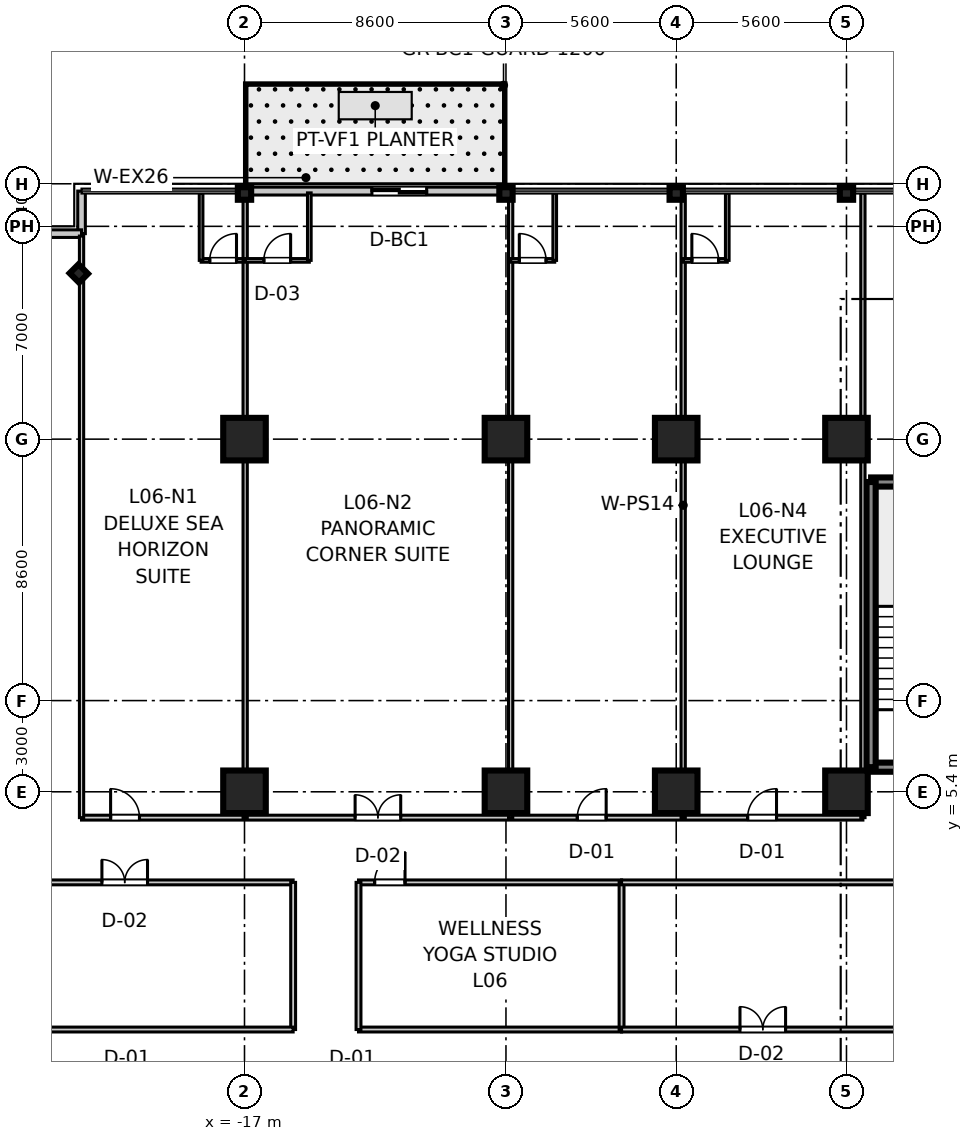
"""IFC4 building model, lengths in metres.
Left out: names, types, materials, properties, quantities, classifications, styles, units other than length and angle.
Written with IfcOpenShell. Run it as: python <this file> out.ifc"""

import sys

from ifc_helpers import new_model, si_unit, direction, frame, frame_2d, origin, origin_2d, place, context, subcontext, project, spatial, rectangle, i_section, extrude, source, transform, mapped, element, fill, save


model = new_model("IFC4")
c1 = context("Model", 3, precision=1e-05, world=origin(), true_north=direction((0.0, 1.0)))
c2 = subcontext(c1, "Body", "Model", "MODEL_VIEW")
j1 = project(units=[si_unit("LENGTHUNIT", "METRE"), si_unit("PLANEANGLEUNIT", "RADIAN")], contexts=[c1])
p1 = place(None, origin())
s1 = spatial("IfcSite", under=j1, at=p1, CompositionType="ELEMENT")
p2 = place(p1, origin())
s2 = spatial("IfcBuilding", under=s1, at=p2, CompositionType="ELEMENT")
p3 = place(p2, frame((0.0, 0.0, 32.4)))
s3 = spatial("IfcBuildingStorey", under=s2, at=p3, CompositionType="ELEMENT", Elevation=32.4)
m1 = source(origin(), c2, "Body", "SweptSolid", [
    extrude(rectangle(XDim=1.4, YDim=1.4, at=origin_2d()), origin(), (0.0, 0.0, 1.0), 3.605),
])
for number, where, z_axis, x_axis in (
    (1, (-17.0, 5.4, 0.0), (0.0, 0.0, 1.0), (1.0, 0.0, 0.0)),
    (2, (-17.0, 17.0, 0.0), (0.0, 0.0, 1.0), (1.0, 0.0, 0.0)),
    (3, (-8.4, 5.4, 0.0), (0.0, 0.0, 1.0), (1.0, 0.0, 0.0)),
    (4, (-8.4, 17.0, 0.0), (0.0, 0.0, 1.0), (1.0, 0.0, 0.0)),
    (5, (-2.8, 5.4, 0.0), (0.0, 0.0, 1.0), (1.0, 0.0, 0.0)),
    (6, (-2.8, 17.0, 0.0), (0.0, 0.0, 1.0), (1.0, 0.0, 0.0)),
    (7, (2.8, 5.4, 0.0), (0.0, 0.0, 1.0), (1.0, 0.0, 0.0)),
    (8, (2.8, 17.0, 0.0), (0.0, 0.0, 1.0), (1.0, 0.0, 0.0)),
):
    element("IfcColumn", number, at=place(p3, frame(where, z_axis=z_axis, x_axis=x_axis)), inside=s3, PredefinedType="COLUMN", context=c2, shape_type="MappedRepresentation", body=[
        mapped(m1, transform((0.0, 0.0, 0.0), scale=1.0)),
    ])
m2 = source(origin(), c2, "Body", "SweptSolid", [
    extrude(i_section(OverallWidth=0.412, OverallDepth=0.438, WebThickness=0.023, FlangeThickness=0.036, at=origin_2d()), origin(), (0.0, 0.0, 1.0), 3.605),
])
for number, where, z_axis, x_axis in (
    (9, (-17.0, 25.08, 0.0), (0.0, 0.0, 1.0), (0.0, 1.0, 0.0)),
    (10, (-8.4, 25.08, 0.0), (0.0, 0.0, 1.0), (0.0, 1.0, 0.0)),
    (11, (-2.8, 25.08, 0.0), (0.0, 0.0, 1.0), (0.0, 1.0, 0.0)),
    (12, (2.8, 25.08, 0.0), (0.0, 0.0, 1.0), (0.0, 1.0, 0.0)),
    (13, (-22.45, 22.45, 0.0), (0.0, 0.0, 1.0), (0.707, 0.707, 0.0)),
):
    element("IfcColumn", number, at=place(p3, frame(where, z_axis=z_axis, x_axis=x_axis)), inside=s3, PredefinedType="COLUMN", context=c2, shape_type="MappedRepresentation", body=[
        mapped(m2, transform((0.0, 0.0, 0.0), scale=1.0)),
    ])
m3 = source(origin(), c2, "Body", "SweptSolid", [
    extrude(rectangle(XDim=3.98, YDim=0.3, at=frame_2d((1.99, 0.0))), origin(), (0.0, 0.0, 1.0), 3.37),
])
for number, where, z_axis, x_axis in (
    (14, (3.61, 6.21, 0.0), (0.0, 0.0, 1.0), (1.0, 0.0, 0.0)),
    (15, (3.61, 15.59, 0.0), (0.0, 0.0, 1.0), (1.0, 0.0, 0.0)),
):
    element("IfcWall", number, at=place(p3, frame(where, z_axis=z_axis, x_axis=x_axis)), inside=s3, PredefinedType="SHEAR", context=c2, shape_type="MappedRepresentation", body=[
        mapped(m3, transform((0.0, 0.0, 0.0), scale=1.0)),
    ])
m4 = source(origin(), c2, "Body", "SweptSolid", [
    extrude(rectangle(XDim=9.38, YDim=0.3, at=frame_2d((4.69, 0.0))), origin(), (0.0, 0.0, 1.0), 3.37),
])
p4 = place(p3, frame((3.61, 6.21, 0.0), z_axis=(0.0, 0.0, 1.0), x_axis=(0.0, 1.0, 0.0)))
e16 = element("IfcWall", 16, at=p4, inside=s3, PredefinedType="SHEAR", context=c2, shape_type="MappedRepresentation", body=[
    mapped(m4, transform((0.0, 0.0, 0.0), scale=1.0)),
])
m5 = source(origin(), c2, "Body", "SweptSolid", [
    extrude(rectangle(XDim=1.4, YDim=0.25, at=frame_2d((0.7, 0.0))), origin(), (0.0, 0.0, 1.0), 3.37),
])
for number, where, z_axis, x_axis in (
    (17, (-22.36, 23.76, 0.0), (0.0, 0.0, 1.0), (0.0, 1.0, 0.0)),
    (18, (-23.76, 23.76, 0.0), (0.0, 0.0, 1.0), (1.0, 0.0, 0.0)),
):
    element("IfcWall", number, at=place(p3, frame(where, z_axis=z_axis, x_axis=x_axis)), inside=s3, PredefinedType="STANDARD", context=c2, shape_type="MappedRepresentation", body=[
        mapped(m5, transform((0.0, 0.0, 0.0), scale=1.0)),
    ])
m6 = source(origin(), c2, "Body", "SweptSolid", [
    extrude(rectangle(XDim=8.6, YDim=0.26, at=frame_2d((4.3, 0.0))), origin(), (0.0, 0.0, 1.0), 2.85),
])
p5 = place(p3, frame((-17.0, 25.16, 0.0), z_axis=(0.0, 0.0, 1.0), x_axis=(1.0, 0.0, 0.0)))
e19 = element("IfcWall", 19, at=p5, inside=s3, PredefinedType="STANDARD", context=c2, shape_type="MappedRepresentation", body=[
    mapped(m6, transform((0.0, 0.0, 0.0), scale=1.0)),
])
p6 = place(p5, frame((4.191, 0.0, 0.0)))
e20 = element("IfcOpeningElement", 20, at=p6, cuts=e19, PredefinedType="OPENING", context=c2, shape_type="SweptSolid", body=[
    extrude(rectangle(XDim=1.8, YDim=2.25, at=frame_2d((0.9, 1.125))), frame((0.0, 0.14, 0.0), z_axis=(0.0, -1.0, 0.0), x_axis=(1.0, 0.0, 0.0)), (0.0, 0.0, 1.0), 0.28),
])
m7 = source(origin(), c2, "Body", "SweptSolid", [
    extrude(rectangle(XDim=25.7, YDim=0.16, at=frame_2d((12.85, 0.0))), origin(), (0.0, 0.0, 1.0), 2.71),
])
p7 = place(p3, frame((-22.36, 4.55, 0.0), z_axis=(0.0, 0.0, 1.0), x_axis=(1.0, 0.0, 0.0)))
e21 = element("IfcWall", 21, at=p7, inside=s3, PredefinedType="PARTITIONING", context=c2, shape_type="MappedRepresentation", body=[
    mapped(m7, transform((0.0, 0.0, 0.0), scale=1.0)),
])
p8 = place(p7, frame((0.956, 0.0, 0.0)))
e22 = element("IfcOpeningElement", 22, at=p8, cuts=e21, PredefinedType="OPENING", context=c2, shape_type="SweptSolid", body=[
    extrude(rectangle(XDim=0.95, YDim=2.1, at=frame_2d((0.475, 1.05))), frame((0.0, 0.09, 0.0), z_axis=(0.0, -1.0, 0.0), x_axis=(1.0, 0.0, 0.0)), (0.0, 0.0, 1.0), 0.18),
])
p9 = place(p7, frame((8.998, 0.0, 0.0)))
e23 = element("IfcOpeningElement", 23, at=p9, cuts=e21, PredefinedType="OPENING", context=c2, shape_type="SweptSolid", body=[
    extrude(rectangle(XDim=1.5, YDim=2.15, at=frame_2d((0.75, 1.075))), frame((0.0, 0.09, 0.0), z_axis=(0.0, -1.0, 0.0), x_axis=(1.0, 0.0, 0.0)), (0.0, 0.0, 1.0), 0.18),
])
p10 = place(p7, frame((16.306, 0.0, 0.0)))
e24 = element("IfcOpeningElement", 24, at=p10, cuts=e21, PredefinedType="OPENING", context=c2, shape_type="SweptSolid", body=[
    extrude(rectangle(XDim=0.95, YDim=2.1, at=frame_2d((0.475, 1.05))), frame((0.0, 0.09, 0.0), z_axis=(0.0, -1.0, 0.0), x_axis=(1.0, 0.0, 0.0)), (0.0, 0.0, 1.0), 0.18),
])
p11 = place(p7, frame((21.909, 0.0, 0.0)))
e25 = element("IfcOpeningElement", 25, at=p11, cuts=e21, PredefinedType="OPENING", context=c2, shape_type="SweptSolid", body=[
    extrude(rectangle(XDim=0.95, YDim=2.1, at=frame_2d((0.475, 1.05))), frame((0.0, 0.09, 0.0), z_axis=(0.0, -1.0, 0.0), x_axis=(1.0, 0.0, 0.0)), (0.0, 0.0, 1.0), 0.18),
])
m8 = source(origin(), c2, "Body", "SweptSolid", [
    extrude(rectangle(XDim=19.13, YDim=0.14, at=frame_2d((9.565, 0.0))), origin(), (0.0, 0.0, 1.0), 2.71),
])
p12 = place(p3, frame((-22.36, 4.55, 0.0), z_axis=(0.0, 0.0, 1.0), x_axis=(0.0, 1.0, 0.0)))
e26 = element("IfcWall", 26, at=p12, inside=s3, PredefinedType="PARTITIONING", context=c2, shape_type="MappedRepresentation", body=[
    mapped(m8, transform((0.0, 0.0, 0.0), scale=1.0)),
])
m9 = source(origin(), c2, "Body", "SweptSolid", [
    extrude(rectangle(XDim=20.55, YDim=0.14, at=frame_2d((10.275, 0.0))), origin(), (0.0, 0.0, 1.0), 2.71),
])
p13 = place(p3, frame((3.34, 4.55, 0.0), z_axis=(0.0, 0.0, 1.0), x_axis=(0.0, 1.0, 0.0)))
e27 = element("IfcWall", 27, at=p13, inside=s3, PredefinedType="PARTITIONING", context=c2, shape_type="MappedRepresentation", body=[
    mapped(m9, transform((0.0, 0.0, 0.0), scale=1.0)),
])
m10 = source(origin(), c2, "Body", "SweptSolid", [
    extrude(rectangle(XDim=1.45, YDim=0.12, at=frame_2d((0.725, 0.0))), origin(), (0.0, 0.0, 1.0), 2.71),
])
p14 = place(p3, frame((-18.428, 22.88, 0.0), z_axis=(0.0, 0.0, 1.0), x_axis=(1.0, 0.0, 0.0)))
e28 = element("IfcWall", 28, at=p14, inside=s3, PredefinedType="PARTITIONING", context=c2, shape_type="MappedRepresentation", body=[
    mapped(m10, transform((0.0, 0.0, 0.0), scale=1.0)),
])
p15 = place(p14, frame((0.285, 0.0, 0.0)))
e29 = element("IfcOpeningElement", 29, at=p15, cuts=e28, PredefinedType="OPENING", context=c2, shape_type="SweptSolid", body=[
    extrude(rectangle(XDim=0.88, YDim=2.1, at=frame_2d((0.44, 1.05))), frame((0.0, 0.07, 0.0), z_axis=(0.0, -1.0, 0.0), x_axis=(1.0, 0.0, 0.0)), (0.0, 0.0, 1.0), 0.14),
])
m11 = source(origin(), c2, "Body", "SweptSolid", [
    extrude(rectangle(XDim=2.22, YDim=0.12, at=frame_2d((1.11, 0.0))), origin(), (0.0, 0.0, 1.0), 2.71),
])
p16 = place(p3, frame((-18.428, 22.88, 0.0), z_axis=(0.0, 0.0, 1.0), x_axis=(0.0, 1.0, 0.0)))
e30 = element("IfcWall", 30, at=p16, inside=s3, PredefinedType="PARTITIONING", context=c2, shape_type="MappedRepresentation", body=[
    mapped(m11, transform((0.0, 0.0, 0.0), scale=1.0)),
])
p17 = place(p3, frame((-16.978, 4.55, 0.0), z_axis=(0.0, 0.0, 1.0), x_axis=(0.0, 1.0, 0.0)))
e31 = element("IfcWall", 31, at=p17, inside=s3, PredefinedType="PARTITIONING", context=c2, shape_type="MappedRepresentation", body=[
    mapped(m9, transform((0.0, 0.0, 0.0), scale=1.0)),
])
m12 = source(origin(), c2, "Body", "SweptSolid", [
    extrude(rectangle(XDim=2.11, YDim=0.12, at=frame_2d((1.055, 0.0))), origin(), (0.0, 0.0, 1.0), 2.71),
])
p18 = place(p3, frame((-16.978, 22.88, 0.0), z_axis=(0.0, 0.0, 1.0), x_axis=(1.0, 0.0, 0.0)))
e32 = element("IfcWall", 32, at=p18, inside=s3, PredefinedType="PARTITIONING", context=c2, shape_type="MappedRepresentation", body=[
    mapped(m12, transform((0.0, 0.0, 0.0), scale=1.0)),
])
p19 = place(p18, frame((0.615, 0.0, 0.0)))
e33 = element("IfcOpeningElement", 33, at=p19, cuts=e32, PredefinedType="OPENING", context=c2, shape_type="SweptSolid", body=[
    extrude(rectangle(XDim=0.88, YDim=2.1, at=frame_2d((0.44, 1.05))), frame((0.0, 0.07, 0.0), z_axis=(0.0, -1.0, 0.0), x_axis=(1.0, 0.0, 0.0)), (0.0, 0.0, 1.0), 0.14),
])
p20 = place(p3, frame((-14.868, 22.88, 0.0), z_axis=(0.0, 0.0, 1.0), x_axis=(0.0, 1.0, 0.0)))
e34 = element("IfcWall", 34, at=p20, inside=s3, PredefinedType="PARTITIONING", context=c2, shape_type="MappedRepresentation", body=[
    mapped(m11, transform((0.0, 0.0, 0.0), scale=1.0)),
])
p21 = place(p3, frame((-8.246, 4.55, 0.0), z_axis=(0.0, 0.0, 1.0), x_axis=(0.0, 1.0, 0.0)))
e35 = element("IfcWall", 35, at=p21, inside=s3, PredefinedType="PARTITIONING", context=c2, shape_type="MappedRepresentation", body=[
    mapped(m9, transform((0.0, 0.0, 0.0), scale=1.0)),
])
m13 = source(origin(), c2, "Body", "SweptSolid", [
    extrude(rectangle(XDim=1.45, YDim=0.12, at=frame_2d((0.725, 0.0))), origin(), (0.0, 0.0, 1.0), 2.71),
])
p22 = place(p3, frame((-8.246, 22.88, 0.0), z_axis=(0.0, 0.0, 1.0), x_axis=(1.0, 0.0, 0.0)))
e36 = element("IfcWall", 36, at=p22, inside=s3, PredefinedType="PARTITIONING", context=c2, shape_type="MappedRepresentation", body=[
    mapped(m13, transform((0.0, 0.0, 0.0), scale=1.0)),
])
p23 = place(p22, frame((0.285, 0.0, 0.0)))
e37 = element("IfcOpeningElement", 37, at=p23, cuts=e36, PredefinedType="OPENING", context=c2, shape_type="SweptSolid", body=[
    extrude(rectangle(XDim=0.88, YDim=2.1, at=frame_2d((0.44, 1.05))), frame((0.0, 0.07, 0.0), z_axis=(0.0, -1.0, 0.0), x_axis=(1.0, 0.0, 0.0)), (0.0, 0.0, 1.0), 0.14),
])
p24 = place(p3, frame((-6.796, 22.88, 0.0), z_axis=(0.0, 0.0, 1.0), x_axis=(0.0, 1.0, 0.0)))
e38 = element("IfcWall", 38, at=p24, inside=s3, PredefinedType="PARTITIONING", context=c2, shape_type="MappedRepresentation", body=[
    mapped(m11, transform((0.0, 0.0, 0.0), scale=1.0)),
])
p25 = place(p3, frame((-2.571, 4.55, 0.0), z_axis=(0.0, 0.0, 1.0), x_axis=(0.0, 1.0, 0.0)))
e39 = element("IfcWall", 39, at=p25, inside=s3, PredefinedType="PARTITIONING", context=c2, shape_type="MappedRepresentation", body=[
    mapped(m9, transform((0.0, 0.0, 0.0), scale=1.0)),
])
p26 = place(p3, frame((-2.571, 22.88, 0.0), z_axis=(0.0, 0.0, 1.0), x_axis=(1.0, 0.0, 0.0)))
e40 = element("IfcWall", 40, at=p26, inside=s3, PredefinedType="PARTITIONING", context=c2, shape_type="MappedRepresentation", body=[
    mapped(m10, transform((0.0, 0.0, 0.0), scale=1.0)),
])
p27 = place(p26, frame((0.285, 0.0, 0.0)))
e41 = element("IfcOpeningElement", 41, at=p27, cuts=e40, PredefinedType="OPENING", context=c2, shape_type="SweptSolid", body=[
    extrude(rectangle(XDim=0.88, YDim=2.1, at=frame_2d((0.44, 1.05))), frame((0.0, 0.07, 0.0), z_axis=(0.0, -1.0, 0.0), x_axis=(1.0, 0.0, 0.0)), (0.0, 0.0, 1.0), 0.14),
])
p28 = place(p3, frame((-1.121, 22.88, 0.0), z_axis=(0.0, 0.0, 1.0), x_axis=(0.0, 1.0, 0.0)))
e42 = element("IfcWall", 42, at=p28, inside=s3, PredefinedType="PARTITIONING", context=c2, shape_type="MappedRepresentation", body=[
    mapped(m11, transform((0.0, 0.0, 0.0), scale=1.0)),
])
m14 = source(origin(), c2, "Body", "SweptSolid", [
    extrude(rectangle(XDim=9.7, YDim=0.16, at=frame_2d((4.85, 0.0))), origin(), (0.0, 0.0, 1.0), 2.71),
])
p29 = place(p3, frame((-25.1, 2.42, 0.0), z_axis=(0.0, 0.0, 1.0), x_axis=(1.0, 0.0, 0.0)))
e43 = element("IfcWall", 43, at=p29, inside=s3, PredefinedType="PARTITIONING", context=c2, shape_type="MappedRepresentation", body=[
    mapped(m14, transform((0.0, 0.0, 0.0), scale=1.0)),
])
p30 = place(p29, frame((3.41, 0.0, 0.0)))
e44 = element("IfcOpeningElement", 44, at=p30, cuts=e43, PredefinedType="OPENING", context=c2, shape_type="SweptSolid", body=[
    extrude(rectangle(XDim=1.5, YDim=2.15, at=frame_2d((0.75, 1.075))), frame((0.0, 0.09, 0.0), z_axis=(0.0, -1.0, 0.0), x_axis=(1.0, 0.0, 0.0)), (0.0, 0.0, 1.0), 0.18),
])
m15 = source(origin(), c2, "Body", "SweptSolid", [
    extrude(rectangle(XDim=4.84, YDim=0.16, at=frame_2d((2.42, 0.0))), origin(), (0.0, 0.0, 1.0), 2.71),
])
p31 = place(p3, frame((-15.4, -2.42, 0.0), z_axis=(0.0, 0.0, 1.0), x_axis=(0.0, 1.0, 0.0)))
e45 = element("IfcWall", 45, at=p31, inside=s3, PredefinedType="PARTITIONING", context=c2, shape_type="MappedRepresentation", body=[
    mapped(m15, transform((0.0, 0.0, 0.0), scale=1.0)),
])
p32 = place(p3, frame((-25.1, -2.42, 0.0), z_axis=(0.0, 0.0, 1.0), x_axis=(1.0, 0.0, 0.0)))
e46 = element("IfcWall", 46, at=p32, inside=s3, PredefinedType="PARTITIONING", context=c2, shape_type="MappedRepresentation", body=[
    mapped(m14, transform((0.0, 0.0, 0.0), scale=1.0)),
])
m16 = source(origin(), c2, "Body", "SweptSolid", [
    extrude(rectangle(XDim=8.652, YDim=0.16, at=frame_2d((4.326, 0.0))), origin(), (0.0, 0.0, 1.0), 2.71),
])
p33 = place(p3, frame((-13.25, -2.42, 0.0), z_axis=(0.0, 0.0, 1.0), x_axis=(1.0, 0.0, 0.0)))
e47 = element("IfcWall", 47, at=p33, inside=s3, PredefinedType="PARTITIONING", context=c2, shape_type="MappedRepresentation", body=[
    mapped(m16, transform((0.0, 0.0, 0.0), scale=1.0)),
])
p34 = place(p3, frame((-13.25, 2.42, 0.0), z_axis=(0.0, 0.0, 1.0), x_axis=(1.0, 0.0, 0.0)))
e48 = element("IfcWall", 48, at=p34, inside=s3, PredefinedType="PARTITIONING", context=c2, shape_type="MappedRepresentation", body=[
    mapped(m16, transform((0.0, 0.0, 0.0), scale=1.0)),
])
p35 = place(p34, frame((0.53, 0.0, 0.0)))
e49 = element("IfcOpeningElement", 49, at=p35, cuts=e48, PredefinedType="OPENING", context=c2, shape_type="SweptSolid", body=[
    extrude(rectangle(XDim=1.0, YDim=2.1, at=frame_2d((0.5, 1.05))), frame((0.0, 0.09, 0.0), z_axis=(0.0, -1.0, 0.0), x_axis=(1.0, 0.0, 0.0)), (0.0, 0.0, 1.0), 0.18),
])
for number, where, z_axis, x_axis in (
    (50, (-13.25, -2.42, 0.0), (0.0, 0.0, 1.0), (0.0, 1.0, 0.0)),
    (51, (-4.598, -2.42, 0.0), (0.0, 0.0, 1.0), (0.0, 1.0, 0.0)),
):
    element("IfcWall", number, at=place(p3, frame(where, z_axis=z_axis, x_axis=x_axis)), inside=s3, PredefinedType="PARTITIONING", context=c2, shape_type="MappedRepresentation", body=[
        mapped(m15, transform((0.0, 0.0, 0.0), scale=1.0)),
    ])
m17 = source(origin(), c2, "Body", "SweptSolid", [
    extrude(rectangle(XDim=11.948, YDim=0.16, at=frame_2d((5.974, 0.0))), origin(), (0.0, 0.0, 1.0), 2.71),
])
p36 = place(p3, frame((-4.598, -2.42, 0.0), z_axis=(0.0, 0.0, 1.0), x_axis=(1.0, 0.0, 0.0)))
e52 = element("IfcWall", 52, at=p36, inside=s3, PredefinedType="PARTITIONING", context=c2, shape_type="MappedRepresentation", body=[
    mapped(m17, transform((0.0, 0.0, 0.0), scale=1.0)),
])
p37 = place(p36, frame((3.895, 0.0, 0.0)))
e53 = element("IfcOpeningElement", 53, at=p37, cuts=e52, PredefinedType="OPENING", context=c2, shape_type="SweptSolid", body=[
    extrude(rectangle(XDim=1.5, YDim=2.15, at=frame_2d((0.75, 1.075))), frame((0.0, 0.09, 0.0), z_axis=(0.0, -1.0, 0.0), x_axis=(1.0, 0.0, 0.0)), (0.0, 0.0, 1.0), 0.18),
])
p38 = place(p3, frame((-4.598, 2.42, 0.0), z_axis=(0.0, 0.0, 1.0), x_axis=(1.0, 0.0, 0.0)))
e54 = element("IfcWall", 54, at=p38, inside=s3, PredefinedType="PARTITIONING", context=c2, shape_type="MappedRepresentation", body=[
    mapped(m17, transform((0.0, 0.0, 0.0), scale=1.0)),
])
m18 = source(origin(), c2, "Body", "SweptSolid", [
    extrude(rectangle(XDim=0.88, YDim=2.1, at=frame_2d((0.44, 1.05))), frame((0.0, 0.025, 0.0), z_axis=(0.0, -1.0, 0.0), x_axis=(1.0, 0.0, 0.0)), (0.0, 0.0, 1.0), 0.05),
])
p39 = place(p15, origin())
e55 = element("IfcDoor", 55, at=p39, inside=s3, OperationType="SINGLE_SWING_RIGHT", PredefinedType="DOOR", context=c2, shape_type="MappedRepresentation", body=[
    mapped(m18, transform((0.0, 0.0, 0.0), scale=1.0)),
])
fill(e29, e55)
m19 = source(origin(), c2, "Body", "SweptSolid", [
    extrude(rectangle(XDim=0.95, YDim=2.1, at=frame_2d((0.475, 1.05))), frame((0.0, 0.025, 0.0), z_axis=(0.0, -1.0, 0.0), x_axis=(1.0, 0.0, 0.0)), (0.0, 0.0, 1.0), 0.05),
])
p40 = place(p8, origin())
e56 = element("IfcDoor", 56, at=p40, inside=s3, OperationType="SINGLE_SWING_LEFT", PredefinedType="DOOR", context=c2, shape_type="MappedRepresentation", body=[
    mapped(m19, transform((0.0, 0.0, 0.0), scale=1.0)),
])
fill(e22, e56)
p41 = place(p19, origin())
e57 = element("IfcDoor", 57, at=p41, inside=s3, OperationType="SINGLE_SWING_RIGHT", PredefinedType="DOOR", context=c2, shape_type="MappedRepresentation", body=[
    mapped(m18, transform((0.0, 0.0, 0.0), scale=1.0)),
])
fill(e33, e57)
m20 = source(origin(), c2, "Body", "SweptSolid", [
    extrude(rectangle(XDim=1.5, YDim=2.15, at=frame_2d((0.75, 1.075))), frame((0.0, 0.025, 0.0), z_axis=(0.0, -1.0, 0.0), x_axis=(1.0, 0.0, 0.0)), (0.0, 0.0, 1.0), 0.05),
])
p42 = place(p9, origin())
e58 = element("IfcDoor", 58, at=p42, inside=s3, OperationType="DOUBLE_DOOR_SINGLE_SWING", PredefinedType="DOOR", context=c2, shape_type="MappedRepresentation", body=[
    mapped(m20, transform((0.0, 0.0, 0.0), scale=1.0)),
])
fill(e23, e58)
p43 = place(p23, origin())
e59 = element("IfcDoor", 59, at=p43, inside=s3, OperationType="SINGLE_SWING_LEFT", PredefinedType="DOOR", context=c2, shape_type="MappedRepresentation", body=[
    mapped(m18, transform((0.0, 0.0, 0.0), scale=1.0)),
])
fill(e37, e59)
p44 = place(p10, origin())
e60 = element("IfcDoor", 60, at=p44, inside=s3, OperationType="SINGLE_SWING_RIGHT", PredefinedType="DOOR", context=c2, shape_type="MappedRepresentation", body=[
    mapped(m19, transform((0.0, 0.0, 0.0), scale=1.0)),
])
fill(e24, e60)
p45 = place(p27, origin())
e61 = element("IfcDoor", 61, at=p45, inside=s3, OperationType="SINGLE_SWING_LEFT", PredefinedType="DOOR", context=c2, shape_type="MappedRepresentation", body=[
    mapped(m18, transform((0.0, 0.0, 0.0), scale=1.0)),
])
fill(e41, e61)
p46 = place(p11, origin())
e62 = element("IfcDoor", 62, at=p46, inside=s3, OperationType="SINGLE_SWING_RIGHT", PredefinedType="DOOR", context=c2, shape_type="MappedRepresentation", body=[
    mapped(m19, transform((0.0, 0.0, 0.0), scale=1.0)),
])
fill(e25, e62)
p47 = place(p30, origin())
e63 = element("IfcDoor", 63, at=p47, inside=s3, OperationType="DOUBLE_DOOR_SINGLE_SWING", PredefinedType="DOOR", context=c2, shape_type="MappedRepresentation", body=[
    mapped(m20, transform((0.0, 0.0, 0.0), scale=1.0)),
])
fill(e44, e63)
m21 = source(origin(), c2, "Body", "SweptSolid", [
    extrude(rectangle(XDim=1.0, YDim=2.1, at=frame_2d((0.5, 1.05))), frame((0.0, 0.025, 0.0), z_axis=(0.0, -1.0, 0.0), x_axis=(1.0, 0.0, 0.0)), (0.0, 0.0, 1.0), 0.05),
])
p48 = place(p35, frame((1.0, 0.0, 0.0), z_axis=(0.0, 0.0, 1.0), x_axis=(-1.0, 0.0, 0.0)))
e64 = element("IfcDoor", 64, at=p48, inside=s3, OperationType="SINGLE_SWING_RIGHT", PredefinedType="DOOR", context=c2, shape_type="MappedRepresentation", body=[
    mapped(m21, transform((0.0, 0.0, 0.0), scale=1.0)),
])
fill(e49, e64)
p49 = place(p37, origin())
e65 = element("IfcDoor", 65, at=p49, inside=s3, OperationType="DOUBLE_DOOR_SINGLE_SWING", PredefinedType="DOOR", context=c2, shape_type="MappedRepresentation", body=[
    mapped(m20, transform((0.0, 0.0, 0.0), scale=1.0)),
])
fill(e53, e65)
m22 = source(origin(), c2, "Body", "SweptSolid", [
    extrude(rectangle(XDim=1.8, YDim=2.25, at=frame_2d((0.9, 1.125))), frame((0.0, 0.025, 0.0), z_axis=(0.0, -1.0, 0.0), x_axis=(1.0, 0.0, 0.0)), (0.0, 0.0, 1.0), 0.05),
])
p50 = place(p6, origin())
e66 = element("IfcDoor", 66, at=p50, inside=s3, OperationType="DOUBLE_DOOR_SLIDING", PredefinedType="DOOR", context=c2, shape_type="MappedRepresentation", body=[
    mapped(m22, transform((0.0, 0.0, 0.0), scale=1.0)),
])
fill(e20, e66)
save(model, sys.argv[1])
